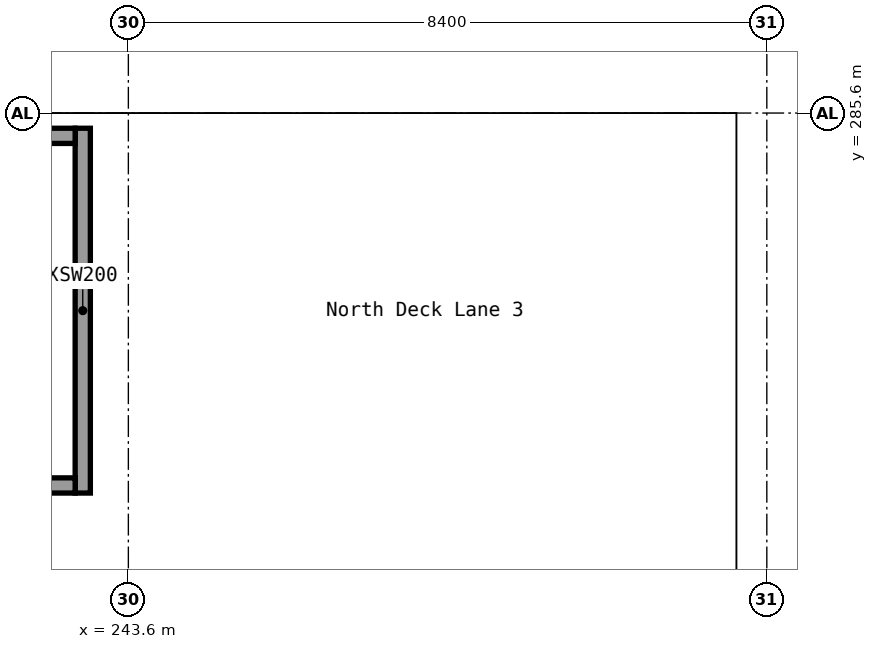
"""IFC4 building model, lengths in metres.
Left out: names, types, materials, properties, quantities, classifications, styles, units other than length and angle.
Written with IfcOpenShell. Run it as: python <this file> out.ifc"""

import sys

from ifc_helpers import new_model, si_unit, direction, frame, frame_2d, origin, place, context, subcontext, project, spatial, rectangle, extrude, element, save


model = new_model("IFC4")
c1 = context("Model", 3, precision=1e-05, world=origin(), true_north=direction((0.0, 1.0)))
c2 = subcontext(c1, "Body", "Model", "MODEL_VIEW")
j1 = project(units=[si_unit("LENGTHUNIT", "METRE"), si_unit("PLANEANGLEUNIT", "RADIAN")], contexts=[c1])
p1 = place(None, origin())
s1 = spatial("IfcSite", under=j1, at=p1, CompositionType="ELEMENT")
p2 = place(p1, origin())
s2 = spatial("IfcBuilding", under=s1, at=p2, CompositionType="ELEMENT")
p3 = place(p2, origin())
s3 = spatial("IfcBuildingStorey", under=s2, at=p3, CompositionType="ELEMENT", Elevation=0.0)
p4 = place(p3, frame((243.0, 280.6, 0.0), z_axis=(0.0, 0.0, 1.0), x_axis=(0.0, 1.0, 0.0)))
e1 = element("IfcWall", 1, at=p4, inside=s3, PredefinedType="SOLIDWALL", context=c2, shape_type="SweptSolid", body=[
    extrude(rectangle(XDim=4.8, YDim=0.2, at=frame_2d((2.4, 0.0))), origin(), (0.0, 0.0, 1.0), 3.2),
])
for number, where, z_axis, x_axis in (
    (2, (235.9, 280.7, 0.0), (0.0, 0.0, 1.0), (1.0, 0.0, 0.0)),
    (3, (235.9, 285.3, 0.0), (0.0, 0.0, 1.0), (1.0, 0.0, 0.0)),
):
    element("IfcWall", number, at=place(p3, frame(where, z_axis=z_axis, x_axis=x_axis)), inside=s3, PredefinedType="SOLIDWALL", context=c2, shape_type="SweptSolid", body=[
        extrude(rectangle(XDim=7.0, YDim=0.2, at=frame_2d((3.5, 0.0))), origin(), (0.0, 0.0, 1.0), 3.2),
    ])
save(model, sys.argv[1])
